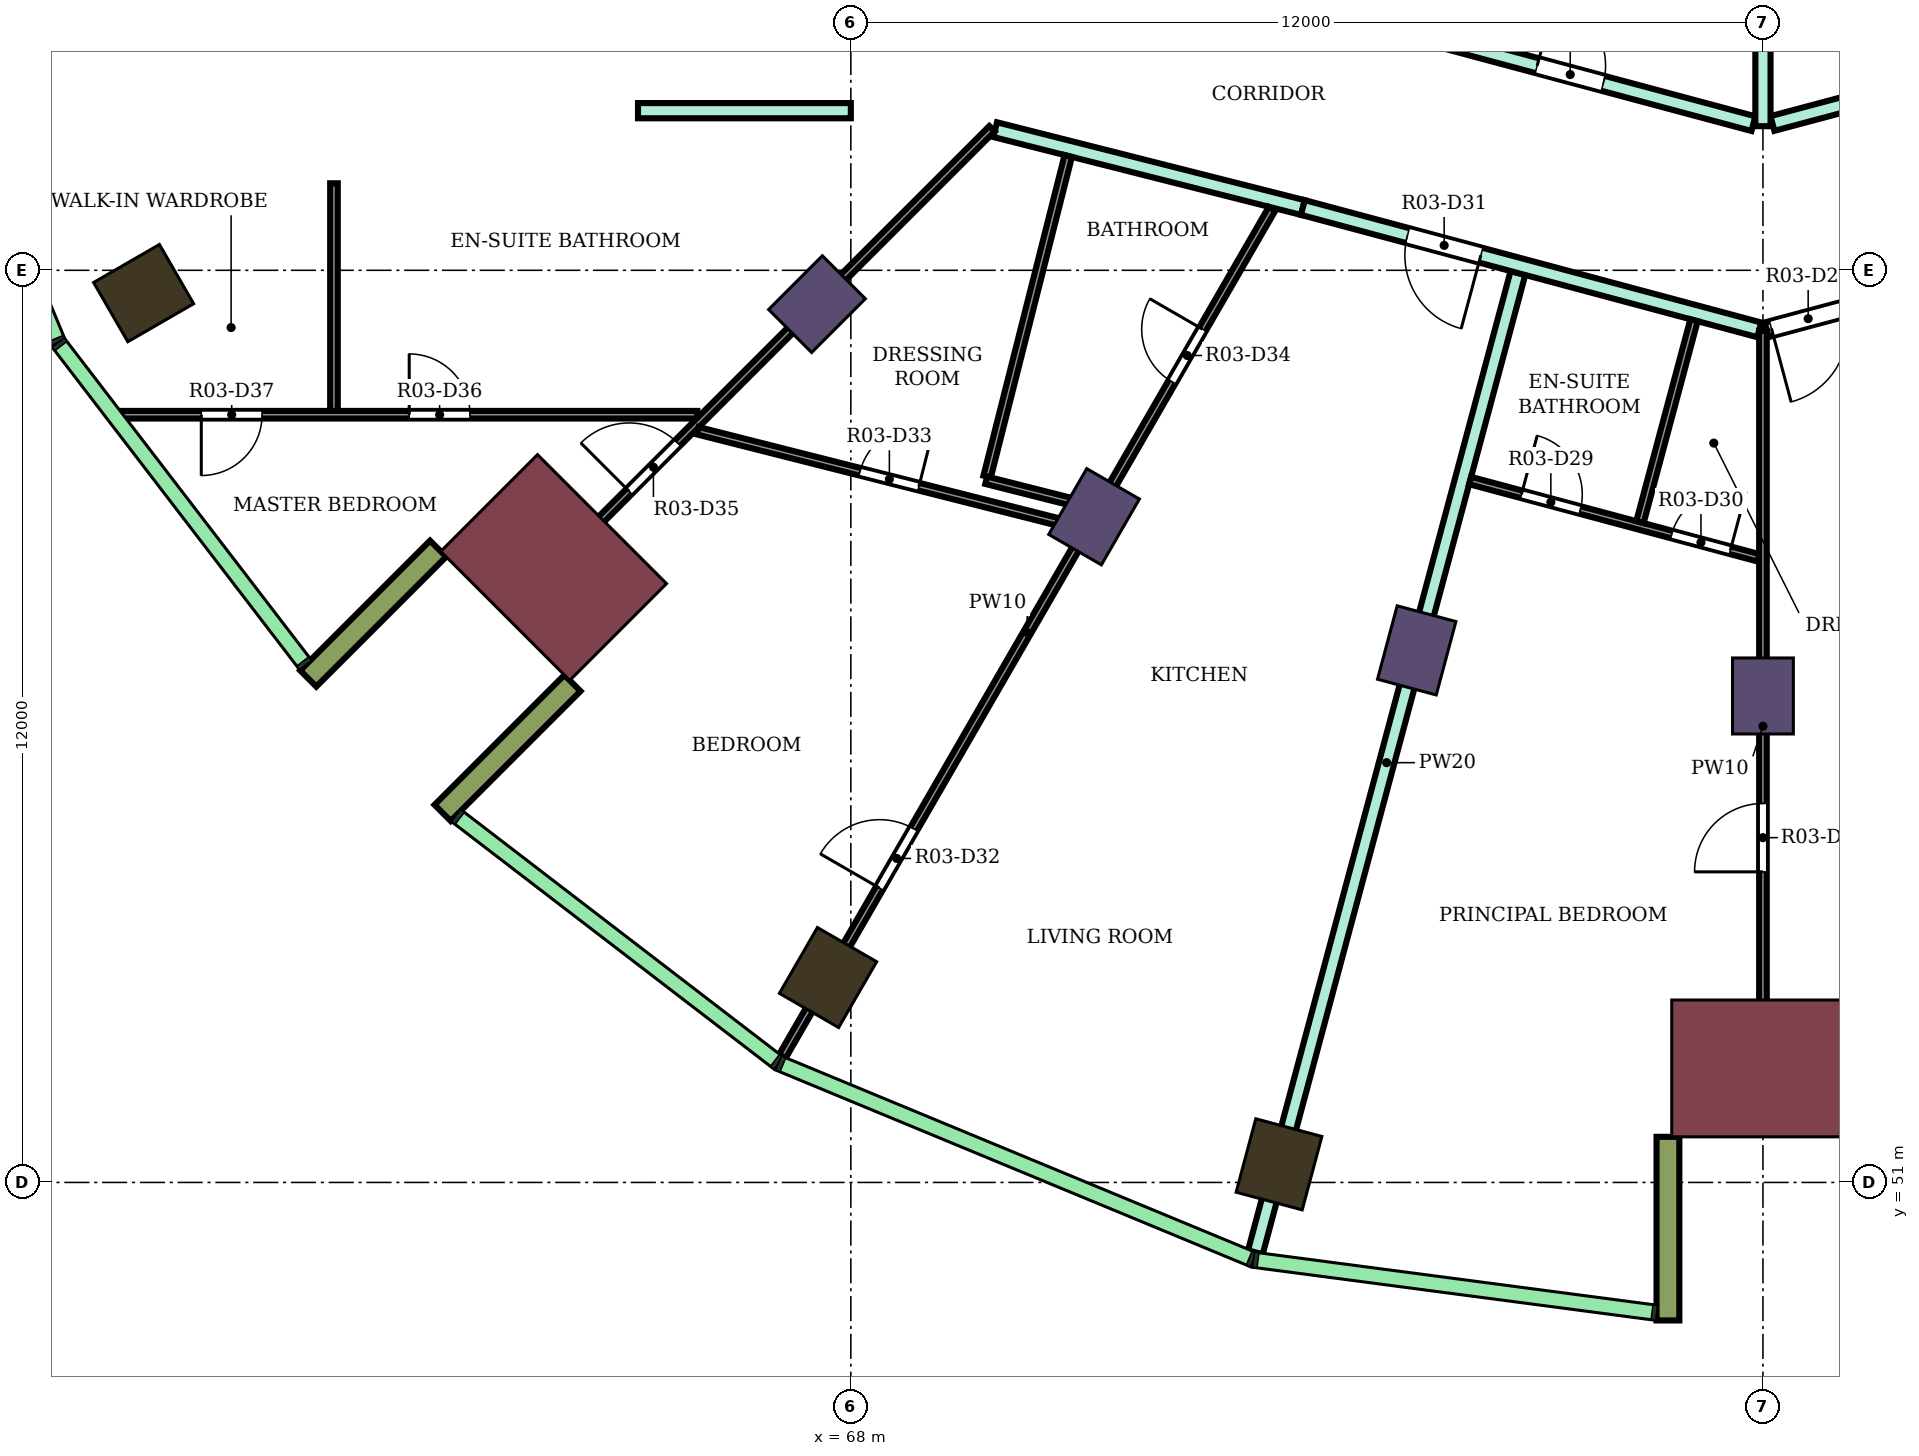
"""IFC4 building model, lengths in metres.
Left out: names, types, materials, properties, quantities, classifications, styles, units other than length and angle.
Written with IfcOpenShell. Run it as: python <this file> out.ifc"""

import sys

from ifc_helpers import new_model, si_unit, direction, frame, frame_2d, origin, origin_2d, place, context, subcontext, project, spatial, rectangle, extrude, element, fill, save


model = new_model("IFC4")
c1 = context("Model", 3, precision=1e-05, world=origin(), true_north=direction((0.0, 1.0)))
c2 = subcontext(c1, "Body", "Model", "MODEL_VIEW")
j1 = project(units=[si_unit("LENGTHUNIT", "METRE"), si_unit("PLANEANGLEUNIT", "RADIAN")], contexts=[c1])
p1 = place(None, origin())
s1 = spatial("IfcSite", under=j1, at=p1, CompositionType="ELEMENT")
p2 = place(p1, origin())
s2 = spatial("IfcBuilding", under=s1, at=p2, CompositionType="ELEMENT")
p3 = place(p2, frame((0.0, 0.0, 190.5)))
s3 = spatial("IfcBuildingStorey", under=s2, at=p3, CompositionType="ELEMENT", Elevation=190.5)
for number, where, z_axis, x_axis in (
    (1, (58.696, 62.7, 0.0), (0.0, 0.0, 1.0), (-0.866, -0.5, 0.0)),
    (2, (67.7, 53.696, 0.0), (0.0, 0.0, 1.0), (-0.5, -0.866, 0.0)),
    (3, (73.633, 51.238, 0.0), (0.0, 0.0, 1.0), (-0.259, -0.966, 0.0)),
):
    element("IfcColumn", number, at=place(p3, frame(where, z_axis=z_axis, x_axis=x_axis)), inside=s3, PredefinedType="COLUMN", context=c2, shape_type="SweptSolid", body=[
        extrude(rectangle(XDim=1.0, YDim=0.9, at=origin_2d()), origin(), (0.0, 0.0, 1.0), 4.1),
    ])
for number, where, z_axis, x_axis in (
    (4, (67.555, 62.555, 0.0), (0.0, 0.0, 1.0), (-0.707, -0.707, 0.0)),
    (5, (71.2, 59.758, 0.0), (0.0, 0.0, 1.0), (-0.5, -0.866, 0.0)),
    (6, (75.445, 58.0, 0.0), (0.0, 0.0, 1.0), (-0.259, -0.966, 0.0)),
    (7, (80.0, 57.4, 0.0), (0.0, 0.0, 1.0), (0.0, -1.0, 0.0)),
):
    element("IfcColumn", number, at=place(p3, frame(where, z_axis=z_axis, x_axis=x_axis)), inside=s3, PredefinedType="COLUMN", context=c2, shape_type="SweptSolid", body=[
        extrude(rectangle(XDim=1.0, YDim=0.8, at=origin_2d()), origin(), (0.0, 0.0, 1.0), 4.1),
    ])
for number, where, z_axis, x_axis in (
    (8, (64.09, 59.09, 0.0), (0.0, 0.0, 1.0), (-0.707, -0.707, 0.0)),
    (9, (80.0, 52.5, 0.0), (0.0, 0.0, 1.0), (0.0, -1.0, 0.0)),
):
    element("IfcColumn", number, at=place(p3, frame(where, z_axis=z_axis, x_axis=x_axis)), inside=s3, PredefinedType="COLUMN", context=c2, shape_type="SweptSolid", body=[
        extrude(rectangle(XDim=1.8, YDim=2.4, at=origin_2d()), origin(), (0.0, 0.0, 1.0), 4.1),
    ])
for number, where, z_axis, x_axis in (
    (10, (62.57, 59.338, 0.0), (0.0, 0.0, 1.0), (-0.707, -0.707, 0.0)),
    (11, (64.338, 57.57, 0.0), (0.0, 0.0, 1.0), (-0.707, -0.707, 0.0)),
    (12, (78.75, 51.6, 0.0), (0.0, 0.0, 1.0), (0.0, -1.0, 0.0)),
):
    element("IfcWall", number, at=place(p3, frame(where, z_axis=z_axis, x_axis=x_axis)), inside=s3, PredefinedType="NOTDEFINED", context=c2, shape_type="SweptSolid", body=[
        extrude(rectangle(XDim=2.416, YDim=0.3, at=frame_2d((1.208, 0.0))), origin(), (0.0, 0.0, 1.0), 4.1),
    ])
p4 = place(p3, frame((65.2, 65.1, 0.0), z_axis=(0.0, 0.0, 1.0), x_axis=(1.0, 0.0, 0.0)))
e13 = element("IfcWall", 13, at=p4, inside=s3, PredefinedType="PARTITIONING", context=c2, shape_type="SweptSolid", body=[
    extrude(rectangle(XDim=2.8, YDim=0.2, at=frame_2d((1.4, 0.0))), origin(), (0.0, 0.0, 1.0), 3.65),
])
p5 = place(p3, frame((69.899, 64.85, 0.0), z_axis=(0.0, 0.0, 1.0), x_axis=(0.969429930153, -0.245368316057, 0.0)))
e14 = element("IfcWall", 14, at=p5, inside=s3, PredefinedType="PARTITIONING", context=c2, shape_type="SweptSolid", body=[
    extrude(rectangle(XDim=4.176, YDim=0.2, at=frame_2d((2.088, 0.0))), origin(), (0.0, 0.0, 1.0), 3.65),
])
p6 = place(p3, frame((73.322, 50.081, 0.0), z_axis=(0.0, 0.0, 1.0), x_axis=(0.258965725415, 0.965886511481, 0.0)))
e15 = element("IfcWall", 15, at=p6, inside=s3, PredefinedType="PARTITIONING", context=c2, shape_type="SweptSolid", body=[
    extrude(rectangle(XDim=13.338, YDim=0.2, at=frame_2d((6.669, 0.0))), origin(), (0.0, 0.0, 1.0), 3.65),
])
p7 = place(p3, frame((73.947, 63.826, 0.0), z_axis=(0.0, 0.0, 1.0), x_axis=(0.965898432367, -0.258921258979, 0.0)))
e16 = element("IfcWall", 16, at=p7, inside=s3, PredefinedType="PARTITIONING", context=c2, shape_type="SweptSolid", body=[
    extrude(rectangle(XDim=6.217, YDim=0.2, at=frame_2d((3.108, 0.0))), origin(), (0.0, 0.0, 1.0), 3.65),
])
p8 = place(p7, frame((1.424, 0.0, 0.0)))
e17 = element("IfcOpeningElement", 17, at=p8, cuts=e16, PredefinedType="OPENING", context=c2, shape_type="SweptSolid", body=[
    extrude(rectangle(XDim=1.0, YDim=2.1, at=frame_2d((0.5, 1.05))), frame((0.0, 0.11, 0.0), z_axis=(0.0, -1.0, 0.0), x_axis=(1.0, 0.0, 0.0)), (0.0, 0.0, 1.0), 0.22),
])
p9 = place(p3, frame((74.603, 66.342, 0.0), z_axis=(0.0, 0.0, 1.0), x_axis=(0.965920893652, -0.258837453254, 0.0)))
e18 = element("IfcWall", 18, at=p9, inside=s3, PredefinedType="PARTITIONING", context=c2, shape_type="SweptSolid", body=[
    extrude(rectangle(XDim=5.458, YDim=0.2, at=frame_2d((2.729, 0.0))), origin(), (0.0, 0.0, 1.0), 3.65),
])
p10 = place(p9, frame((2.512, 0.0, 0.0)))
e19 = element("IfcOpeningElement", 19, at=p10, cuts=e18, PredefinedType="OPENING", context=c2, shape_type="SweptSolid", body=[
    extrude(rectangle(XDim=0.9, YDim=2.1, at=frame_2d((0.45, 1.05))), frame((0.0, 0.11, 0.0), z_axis=(0.0, -1.0, 0.0), x_axis=(1.0, 0.0, 0.0)), (0.0, 0.0, 1.0), 0.22),
])
p11 = place(p3, frame((80.125, 64.932, 0.0), z_axis=(0.0, 0.0, 1.0), x_axis=(0.966236955806, 0.257655089674, 0.0)))
e20 = element("IfcWall", 20, at=p11, inside=s3, PredefinedType="PARTITIONING", context=c2, shape_type="SweptSolid", body=[
    extrude(rectangle(XDim=8.039, YDim=0.2, at=frame_2d((4.02, 0.0))), origin(), (0.0, 0.0, 1.0), 3.65),
])
p12 = place(p11, frame((6.298, 0.0, 0.0)))
e21 = element("IfcOpeningElement", 21, at=p12, cuts=e20, PredefinedType="OPENING", context=c2, shape_type="SweptSolid", body=[
    extrude(rectangle(XDim=0.9, YDim=2.1, at=frame_2d((0.45, 1.05))), frame((0.0, 0.11, 0.0), z_axis=(0.0, -1.0, 0.0), x_axis=(1.0, 0.0, 0.0)), (0.0, 0.0, 1.0), 0.22),
])
p13 = place(p11, frame((2.045, 0.0, 0.0)))
e22 = element("IfcOpeningElement", 22, at=p13, cuts=e20, PredefinedType="OPENING", context=c2, shape_type="SweptSolid", body=[
    extrude(rectangle(XDim=0.9, YDim=2.1, at=frame_2d((0.45, 1.05))), frame((0.0, 0.11, 0.0), z_axis=(0.0, -1.0, 0.0), x_axis=(1.0, 0.0, 0.0)), (0.0, 0.0, 1.0), 0.22),
])
p14 = place(p3, frame((80.048, 62.217, 0.0), z_axis=(0.0, 0.0, 1.0), x_axis=(0.965967276872, 0.258664299841, 0.0)))
e23 = element("IfcWall", 23, at=p14, inside=s3, PredefinedType="PARTITIONING", context=c2, shape_type="SweptSolid", body=[
    extrude(rectangle(XDim=6.007, YDim=0.2, at=frame_2d((3.003, 0.0))), origin(), (0.0, 0.0, 1.0), 3.65),
])
p15 = place(p14, frame((0.066, 0.0, 0.0)))
e24 = element("IfcOpeningElement", 24, at=p15, cuts=e23, PredefinedType="OPENING", context=c2, shape_type="SweptSolid", body=[
    extrude(rectangle(XDim=1.0, YDim=2.1, at=frame_2d((0.5, 1.05))), frame((0.0, 0.11, 0.0), z_axis=(0.0, -1.0, 0.0), x_axis=(1.0, 0.0, 0.0)), (0.0, 0.0, 1.0), 0.22),
])
p16 = place(p3, frame((80.0, 64.896, 0.0), z_axis=(0.0, 0.0, 1.0), x_axis=(0.0, 1.0, 0.0)))
e25 = element("IfcWall", 25, at=p16, inside=s3, PredefinedType="PARTITIONING", context=c2, shape_type="SweptSolid", body=[
    extrude(rectangle(XDim=2.405, YDim=0.2, at=frame_2d((1.203, 0.0))), origin(), (0.0, 0.0, 1.0), 3.65),
])
p17 = place(p3, frame((58.379, 61.1, 0.0), z_axis=(0.0, 0.0, 1.0), x_axis=(1.0, 0.0, 0.0)))
e26 = element("IfcWall", 26, at=p17, inside=s3, PredefinedType="PARTITIONING", context=c2, shape_type="SweptSolid", body=[
    extrude(rectangle(XDim=7.601, YDim=0.1, at=frame_2d((3.801, 0.0))), origin(), (0.0, 0.0, 1.0), 3.65),
])
p18 = place(p17, frame((3.811, 0.0, 0.0)))
e27 = element("IfcOpeningElement", 27, at=p18, cuts=e26, PredefinedType="OPENING", context=c2, shape_type="SweptSolid", body=[
    extrude(rectangle(XDim=0.8, YDim=2.1, at=frame_2d((0.4, 1.05))), frame((0.0, 0.06, 0.0), z_axis=(0.0, -1.0, 0.0), x_axis=(1.0, 0.0, 0.0)), (0.0, 0.0, 1.0), 0.12),
])
p19 = place(p17, frame((1.075, 0.0, 0.0)))
e28 = element("IfcOpeningElement", 28, at=p19, cuts=e26, PredefinedType="OPENING", context=c2, shape_type="SweptSolid", body=[
    extrude(rectangle(XDim=0.8, YDim=2.1, at=frame_2d((0.4, 1.05))), frame((0.0, 0.06, 0.0), z_axis=(0.0, -1.0, 0.0), x_axis=(1.0, 0.0, 0.0)), (0.0, 0.0, 1.0), 0.12),
])
p20 = place(p3, frame((61.2, 61.15, 0.0), z_axis=(0.0, 0.0, 1.0), x_axis=(0.0, 1.0, 0.0)))
e29 = element("IfcWall", 29, at=p20, inside=s3, PredefinedType="PARTITIONING", context=c2, shape_type="SweptSolid", body=[
    extrude(rectangle(XDim=2.995, YDim=0.1, at=frame_2d((1.498, 0.0))), origin(), (0.0, 0.0, 1.0), 3.65),
])
p21 = place(p3, frame((63.592, 58.6, 0.0), z_axis=(0.0, 0.0, 1.0), x_axis=(0.707272108928, 0.706941414781, 0.0)))
e30 = element("IfcWall", 30, at=p21, inside=s3, PredefinedType="PARTITIONING", context=c2, shape_type="SweptSolid", body=[
    extrude(rectangle(XDim=8.859, YDim=0.1, at=frame_2d((4.43, 0.0))), origin(), (0.0, 0.0, 1.0), 3.65),
])
p22 = place(p21, frame((2.111, 0.0, 0.0)))
e31 = element("IfcOpeningElement", 31, at=p22, cuts=e30, PredefinedType="OPENING", context=c2, shape_type="SweptSolid", body=[
    extrude(rectangle(XDim=0.9, YDim=2.1, at=frame_2d((0.45, 1.05))), frame((0.0, 0.06, 0.0), z_axis=(0.0, -1.0, 0.0), x_axis=(1.0, 0.0, 0.0)), (0.0, 0.0, 1.0), 0.12),
])
p23 = place(p3, frame((65.987, 60.889, 0.0), z_axis=(0.0, 0.0, 1.0), x_axis=(0.969431303535, -0.245362889871, 0.0)))
e32 = element("IfcWall", 32, at=p23, inside=s3, PredefinedType="PARTITIONING", context=c2, shape_type="SweptSolid", body=[
    extrude(rectangle(XDim=5.22, YDim=0.1, at=frame_2d((2.61, 0.0))), origin(), (0.0, 0.0, 1.0), 3.65),
])
p24 = place(p23, frame((2.2, 0.0, 0.0)))
e33 = element("IfcOpeningElement", 33, at=p24, cuts=e32, PredefinedType="OPENING", context=c2, shape_type="SweptSolid", body=[
    extrude(rectangle(XDim=0.8, YDim=2.1, at=frame_2d((0.4, 1.05))), frame((0.0, 0.06, 0.0), z_axis=(0.0, -1.0, 0.0), x_axis=(1.0, 0.0, 0.0)), (0.0, 0.0, 1.0), 0.12),
])
p25 = place(p3, frame((67.099, 52.66, 0.0), z_axis=(0.0, 0.0, 1.0), x_axis=(0.500286442712, 0.865859962834, 0.0)))
e34 = element("IfcWall", 34, at=p25, inside=s3, PredefinedType="PARTITIONING", context=c2, shape_type="SweptSolid", body=[
    extrude(rectangle(XDim=12.876, YDim=0.1, at=frame_2d((6.438, 0.0))), origin(), (0.0, 0.0, 1.0), 3.65),
])
p26 = place(p25, frame((2.556, 0.0, 0.0)))
e35 = element("IfcOpeningElement", 35, at=p26, cuts=e34, PredefinedType="OPENING", context=c2, shape_type="SweptSolid", body=[
    extrude(rectangle(XDim=0.9, YDim=2.1, at=frame_2d((0.45, 1.05))), frame((0.0, 0.06, 0.0), z_axis=(0.0, -1.0, 0.0), x_axis=(1.0, 0.0, 0.0)), (0.0, 0.0, 1.0), 0.12),
])
p27 = place(p25, frame((10.248, 0.0, 0.0)))
e36 = element("IfcOpeningElement", 36, at=p27, cuts=e34, PredefinedType="OPENING", context=c2, shape_type="SweptSolid", body=[
    extrude(rectangle(XDim=0.8, YDim=2.1, at=frame_2d((0.4, 1.05))), frame((0.0, 0.06, 0.0), z_axis=(0.0, -1.0, 0.0), x_axis=(1.0, 0.0, 0.0)), (0.0, 0.0, 1.0), 0.12),
])
p28 = place(p3, frame((69.793, 60.287, 0.0), z_axis=(0.0, 0.0, 1.0), x_axis=(0.245307703654, 0.969445269486, 0.0)))
e37 = element("IfcWall", 37, at=p28, inside=s3, PredefinedType="PARTITIONING", context=c2, shape_type="SweptSolid", body=[
    extrude(rectangle(XDim=4.35, YDim=0.1, at=frame_2d((2.175, 0.0))), origin(), (0.0, 0.0, 1.0), 3.65),
])
p29 = place(p3, frame((69.781, 60.238, 0.0), z_axis=(0.0, 0.0, 1.0), x_axis=(0.969502558328, -0.245081189397, 0.0)))
e38 = element("IfcWall", 38, at=p29, inside=s3, PredefinedType="PARTITIONING", context=c2, shape_type="SweptSolid", body=[
    extrude(rectangle(XDim=1.466, YDim=0.1, at=frame_2d((0.733, 0.0))), origin(), (0.0, 0.0, 1.0), 3.65),
])
p30 = place(p3, frame((76.147, 60.234, 0.0), z_axis=(0.0, 0.0, 1.0), x_axis=(0.965925861199, -0.258818914816, 0.0)))
e39 = element("IfcWall", 39, at=p30, inside=s3, PredefinedType="PARTITIONING", context=c2, shape_type="SweptSolid", body=[
    extrude(rectangle(XDim=3.929, YDim=0.1, at=frame_2d((1.964, 0.0))), origin(), (0.0, 0.0, 1.0), 3.65),
])
p31 = place(p30, frame((0.7, 0.0, 0.0)))
e40 = element("IfcOpeningElement", 40, at=p31, cuts=e39, PredefinedType="OPENING", context=c2, shape_type="SweptSolid", body=[
    extrude(rectangle(XDim=0.8, YDim=2.1, at=frame_2d((0.4, 1.05))), frame((0.0, 0.06, 0.0), z_axis=(0.0, -1.0, 0.0), x_axis=(1.0, 0.0, 0.0)), (0.0, 0.0, 1.0), 0.12),
])
p32 = place(p30, frame((2.745, 0.0, 0.0)))
e41 = element("IfcOpeningElement", 41, at=p32, cuts=e39, PredefinedType="OPENING", context=c2, shape_type="SweptSolid", body=[
    extrude(rectangle(XDim=0.8, YDim=2.1, at=frame_2d((0.4, 1.05))), frame((0.0, 0.06, 0.0), z_axis=(0.0, -1.0, 0.0), x_axis=(1.0, 0.0, 0.0)), (0.0, 0.0, 1.0), 0.12),
])
p33 = place(p3, frame((78.382, 59.687, 0.0), z_axis=(0.0, 0.0, 1.0), x_axis=(0.258629573817, 0.965976575051, 0.0)))
e42 = element("IfcWall", 42, at=p33, inside=s3, PredefinedType="PARTITIONING", context=c2, shape_type="SweptSolid", body=[
    extrude(rectangle(XDim=2.75, YDim=0.1, at=frame_2d((1.375, 0.0))), origin(), (0.0, 0.0, 1.0), 3.65),
])
p34 = place(p3, frame((80.0, 51.8, 0.0), z_axis=(0.0, 0.0, 1.0), x_axis=(0.0, 1.0, 0.0)))
e43 = element("IfcWall", 43, at=p34, inside=s3, PredefinedType="PARTITIONING", context=c2, shape_type="SweptSolid", body=[
    extrude(rectangle(XDim=10.404, YDim=0.1, at=frame_2d((5.202, 0.0))), origin(), (0.0, 0.0, 1.0), 3.65),
])
p35 = place(p34, frame((3.286, 0.0, 0.0)))
e44 = element("IfcOpeningElement", 44, at=p35, cuts=e43, PredefinedType="OPENING", context=c2, shape_type="SweptSolid", body=[
    extrude(rectangle(XDim=0.9, YDim=2.1, at=frame_2d((0.45, 1.05))), frame((0.0, 0.06, 0.0), z_axis=(0.0, -1.0, 0.0), x_axis=(1.0, 0.0, 0.0)), (0.0, 0.0, 1.0), 0.12),
])
p36 = place(p15, frame((1.0, 0.0, 0.0), z_axis=(0.0, 0.0, 1.0), x_axis=(-1.0, 0.0, 0.0)))
e45 = element("IfcDoor", 45, at=p36, inside=s3, OperationType="SINGLE_SWING_RIGHT", PredefinedType="DOOR", context=c2, shape_type="SweptSolid", body=[
    extrude(rectangle(XDim=1.0, YDim=2.1, at=frame_2d((0.5, 1.05))), frame((0.0, 0.025, 0.0), z_axis=(0.0, -1.0, 0.0), x_axis=(1.0, 0.0, 0.0)), (0.0, 0.0, 1.0), 0.05),
])
fill(e24, e45)
p37 = place(p35, origin())
e46 = element("IfcDoor", 46, at=p37, inside=s3, OperationType="SINGLE_SWING_LEFT", PredefinedType="DOOR", context=c2, shape_type="SweptSolid", body=[
    extrude(rectangle(XDim=0.9, YDim=2.1, at=frame_2d((0.45, 1.05))), frame((0.0, 0.025, 0.0), z_axis=(0.0, -1.0, 0.0), x_axis=(1.0, 0.0, 0.0)), (0.0, 0.0, 1.0), 0.05),
])
fill(e44, e46)
p38 = place(p31, origin())
e47 = element("IfcDoor", 47, at=p38, inside=s3, OperationType="SINGLE_SWING_LEFT", PredefinedType="DOOR", context=c2, shape_type="SweptSolid", body=[
    extrude(rectangle(XDim=0.8, YDim=2.1, at=frame_2d((0.4, 1.05))), frame((0.0, 0.025, 0.0), z_axis=(0.0, -1.0, 0.0), x_axis=(1.0, 0.0, 0.0)), (0.0, 0.0, 1.0), 0.05),
])
fill(e40, e47)
p39 = place(p32, origin())
e48 = element("IfcDoor", 48, at=p39, inside=s3, OperationType="SINGLE_SWING_RIGHT", PredefinedType="DOOR", context=c2, shape_type="SweptSolid", body=[
    extrude(rectangle(XDim=0.8, YDim=2.1, at=frame_2d((0.4, 1.05))), frame((0.0, 0.025, 0.0), z_axis=(0.0, -1.0, 0.0), x_axis=(1.0, 0.0, 0.0)), (0.0, 0.0, 1.0), 0.05),
])
fill(e41, e48)
p40 = place(p8, frame((1.0, 0.0, 0.0), z_axis=(0.0, 0.0, 1.0), x_axis=(-1.0, 0.0, 0.0)))
e49 = element("IfcDoor", 49, at=p40, inside=s3, OperationType="SINGLE_SWING_LEFT", PredefinedType="DOOR", context=c2, shape_type="SweptSolid", body=[
    extrude(rectangle(XDim=1.0, YDim=2.1, at=frame_2d((0.5, 1.05))), frame((0.0, 0.025, 0.0), z_axis=(0.0, -1.0, 0.0), x_axis=(1.0, 0.0, 0.0)), (0.0, 0.0, 1.0), 0.05),
])
fill(e17, e49)
p41 = place(p26, origin())
e50 = element("IfcDoor", 50, at=p41, inside=s3, OperationType="SINGLE_SWING_LEFT", PredefinedType="DOOR", context=c2, shape_type="SweptSolid", body=[
    extrude(rectangle(XDim=0.9, YDim=2.1, at=frame_2d((0.45, 1.05))), frame((0.0, 0.025, 0.0), z_axis=(0.0, -1.0, 0.0), x_axis=(1.0, 0.0, 0.0)), (0.0, 0.0, 1.0), 0.05),
])
fill(e35, e50)
p42 = place(p24, origin())
e51 = element("IfcDoor", 51, at=p42, inside=s3, OperationType="SINGLE_SWING_RIGHT", PredefinedType="DOOR", context=c2, shape_type="SweptSolid", body=[
    extrude(rectangle(XDim=0.8, YDim=2.1, at=frame_2d((0.4, 1.05))), frame((0.0, 0.025, 0.0), z_axis=(0.0, -1.0, 0.0), x_axis=(1.0, 0.0, 0.0)), (0.0, 0.0, 1.0), 0.05),
])
fill(e33, e51)
p43 = place(p27, origin())
e52 = element("IfcDoor", 52, at=p43, inside=s3, OperationType="SINGLE_SWING_RIGHT", PredefinedType="DOOR", context=c2, shape_type="SweptSolid", body=[
    extrude(rectangle(XDim=0.8, YDim=2.1, at=frame_2d((0.4, 1.05))), frame((0.0, 0.025, 0.0), z_axis=(0.0, -1.0, 0.0), x_axis=(1.0, 0.0, 0.0)), (0.0, 0.0, 1.0), 0.05),
])
fill(e36, e52)
p44 = place(p22, origin())
e53 = element("IfcDoor", 53, at=p44, inside=s3, OperationType="SINGLE_SWING_LEFT", PredefinedType="DOOR", context=c2, shape_type="SweptSolid", body=[
    extrude(rectangle(XDim=0.9, YDim=2.1, at=frame_2d((0.45, 1.05))), frame((0.0, 0.025, 0.0), z_axis=(0.0, -1.0, 0.0), x_axis=(1.0, 0.0, 0.0)), (0.0, 0.0, 1.0), 0.05),
])
fill(e31, e53)
p45 = place(p18, origin())
e54 = element("IfcDoor", 54, at=p45, inside=s3, OperationType="SINGLE_SWING_LEFT", PredefinedType="DOOR", context=c2, shape_type="SweptSolid", body=[
    extrude(rectangle(XDim=0.8, YDim=2.1, at=frame_2d((0.4, 1.05))), frame((0.0, 0.025, 0.0), z_axis=(0.0, -1.0, 0.0), x_axis=(1.0, 0.0, 0.0)), (0.0, 0.0, 1.0), 0.05),
])
fill(e27, e54)
p46 = place(p19, frame((0.8, 0.0, 0.0), z_axis=(0.0, 0.0, 1.0), x_axis=(-1.0, 0.0, 0.0)))
e55 = element("IfcDoor", 55, at=p46, inside=s3, OperationType="SINGLE_SWING_RIGHT", PredefinedType="DOOR", context=c2, shape_type="SweptSolid", body=[
    extrude(rectangle(XDim=0.8, YDim=2.1, at=frame_2d((0.4, 1.05))), frame((0.0, 0.025, 0.0), z_axis=(0.0, -1.0, 0.0), x_axis=(1.0, 0.0, 0.0)), (0.0, 0.0, 1.0), 0.05),
])
fill(e28, e55)
p47 = place(p10, origin())
e56 = element("IfcDoor", 56, at=p47, inside=s3, OperationType="SINGLE_SWING_LEFT", PredefinedType="DOOR", context=c2, shape_type="SweptSolid", body=[
    extrude(rectangle(XDim=0.9, YDim=2.1, at=frame_2d((0.45, 1.05))), frame((0.0, 0.025, 0.0), z_axis=(0.0, -1.0, 0.0), x_axis=(1.0, 0.0, 0.0)), (0.0, 0.0, 1.0), 0.05),
])
fill(e19, e56)
save(model, sys.argv[1])
